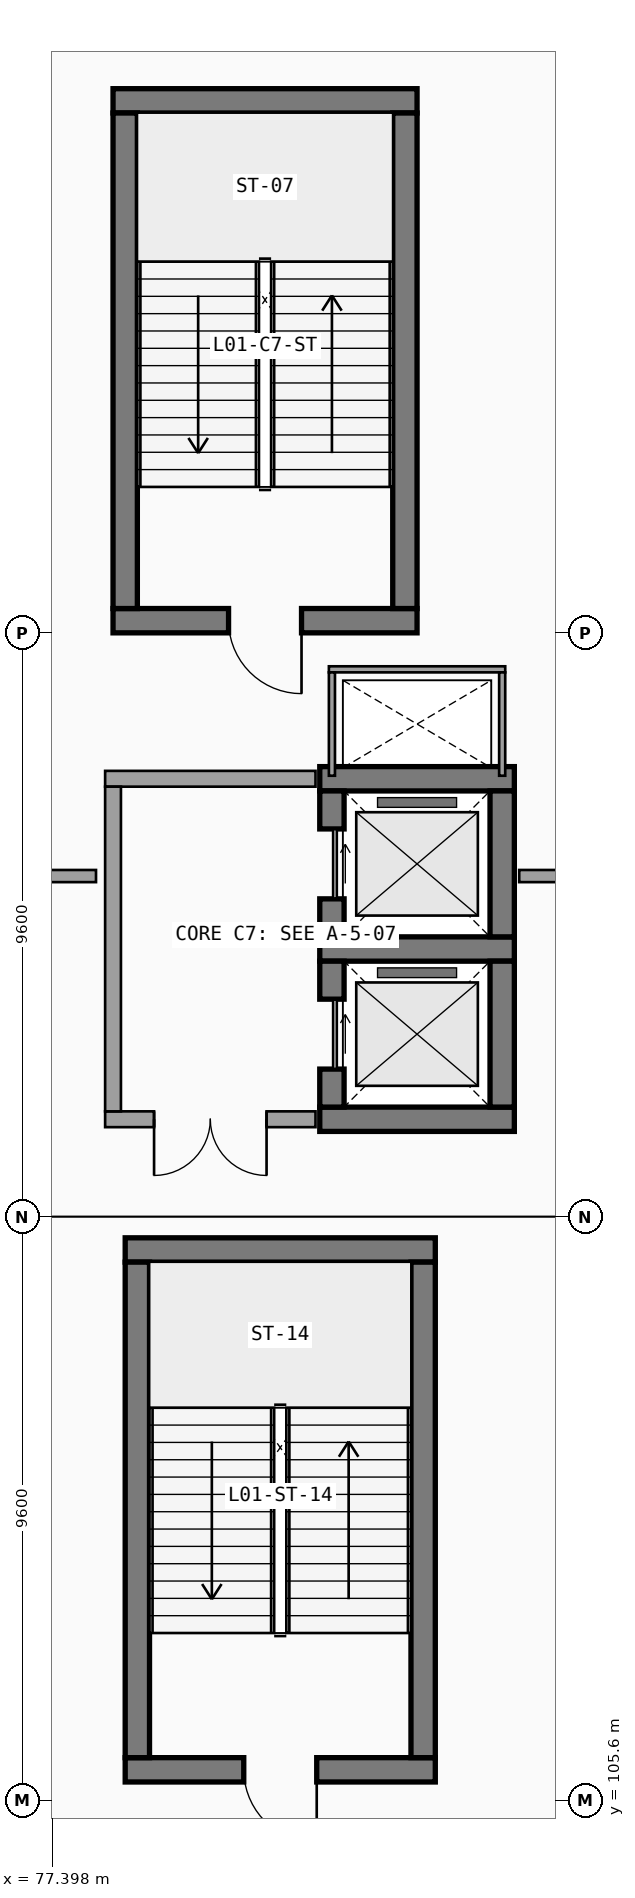
"""IFC4 building model, lengths in metres.
Left out: names, types, materials, properties, quantities, classifications, styles, units other than length and angle.
Written with IfcOpenShell. Run it as: python <this file> out.ifc"""

import sys

from ifc_helpers import new_model, si_unit, direction, frame, frame_2d, origin, place, context, subcontext, project, spatial, rectangle, extrude, element, fill, save


model = new_model("IFC4")
c1 = context("Model", 3, precision=1e-05, world=origin(), true_north=direction((0.0, 1.0)))
c2 = subcontext(c1, "Body", "Model", "MODEL_VIEW")
j1 = project(units=[si_unit("LENGTHUNIT", "METRE"), si_unit("PLANEANGLEUNIT", "RADIAN")], contexts=[c1])
p1 = place(None, origin())
s1 = spatial("IfcSite", under=j1, at=p1, CompositionType="ELEMENT")
p2 = place(p1, origin())
s2 = spatial("IfcBuilding", under=s1, at=p2, CompositionType="ELEMENT")
p3 = place(p2, frame((0.0, 0.0, 4.8)))
s3 = spatial("IfcBuildingStorey", under=s2, at=p3, CompositionType="ELEMENT", Elevation=4.8)
p4 = place(p3, frame((78.4, 125.0, 0.0), z_axis=(0.0, 0.0, 1.0), x_axis=(1.0, 0.0, 0.0)))
e1 = element("IfcWall", 1, at=p4, inside=s3, PredefinedType="SHEAR", context=c2, shape_type="SweptSolid", body=[
    extrude(rectangle(XDim=5.0, YDim=0.4, at=frame_2d((2.5, 0.0))), origin(), (0.0, 0.0, 1.0), 4.52),
])
p5 = place(p4, frame((3.1, 0.0, 0.0), z_axis=(0.0, 0.0, 1.0), x_axis=(-1.0, 0.0, 0.0)))
e2 = element("IfcOpeningElement", 2, at=p5, cuts=e1, PredefinedType="OPENING", context=c2, shape_type="SweptSolid", body=[
    extrude(rectangle(XDim=1.2, YDim=2.2, at=frame_2d((0.6, 1.1))), frame((0.0, 0.21, 0.0), z_axis=(0.0, -1.0, 0.0), x_axis=(1.0, 0.0, 0.0)), (0.0, 0.0, 1.0), 0.42),
])
p6 = place(p3, frame((83.4, 133.55, 0.0), z_axis=(0.0, 0.0, 1.0), x_axis=(-1.0, 0.0, 0.0)))
e3 = element("IfcWall", 3, at=p6, inside=s3, PredefinedType="SHEAR", context=c2, shape_type="SweptSolid", body=[
    extrude(rectangle(XDim=5.0, YDim=0.4, at=frame_2d((2.5, 0.0))), origin(), (0.0, 0.0, 1.0), 4.52),
])
for number, where, z_axis, x_axis in (
    (4, (78.6, 133.35, 0.0), (0.0, 0.0, 1.0), (0.0, -1.0, 0.0)),
    (5, (83.2, 125.2, 0.0), (0.0, 0.0, 1.0), (0.0, 1.0, 0.0)),
):
    element("IfcWall", number, at=place(p3, frame(where, z_axis=z_axis, x_axis=x_axis)), inside=s3, PredefinedType="SHEAR", context=c2, shape_type="SweptSolid", body=[
        extrude(rectangle(XDim=8.15, YDim=0.4, at=frame_2d((4.075, 0.0))), origin(), (0.0, 0.0, 1.0), 4.52),
    ])
for number, where, z_axis, x_axis in (
    (6, (81.8, 116.8, 0.0), (0.0, 0.0, 1.0), (1.0, 0.0, 0.0)),
    (7, (85.0, 119.6, 0.0), (0.0, 0.0, 1.0), (-1.0, 0.0, 0.0)),
):
    element("IfcWall", number, at=place(p3, frame(where, z_axis=z_axis, x_axis=x_axis)), inside=s3, PredefinedType="SHEAR", context=c2, shape_type="SweptSolid", body=[
        extrude(rectangle(XDim=3.2, YDim=0.4, at=frame_2d((1.6, 0.0))), origin(), (0.0, 0.0, 1.0), 4.52),
    ])
p7 = place(p3, frame((82.0, 119.4, 0.0), z_axis=(0.0, 0.0, 1.0), x_axis=(0.0, -1.0, 0.0)))
e8 = element("IfcWall", 8, at=p7, inside=s3, PredefinedType="SHEAR", context=c2, shape_type="SweptSolid", body=[
    extrude(rectangle(XDim=2.4, YDim=0.4, at=frame_2d((1.2, 0.0))), origin(), (0.0, 0.0, 1.0), 4.52),
])
p8 = place(p7, frame((0.625, 0.0, 0.0), z_axis=(0.0, 0.0, 1.0), x_axis=(1.0, 0.0, 0.0)))
e9 = element("IfcOpeningElement", 9, at=p8, cuts=e8, PredefinedType="OPENING", context=c2, shape_type="SweptSolid", body=[
    extrude(rectangle(XDim=1.15, YDim=2.2, at=frame_2d((0.575, 1.1))), frame((0.0, 0.21, 0.0), z_axis=(0.0, -1.0, 0.0), x_axis=(1.0, 0.0, 0.0)), (0.0, 0.0, 1.0), 0.42),
])
p9 = place(p3, frame((84.8, 117.0, 0.0), z_axis=(0.0, 0.0, 1.0), x_axis=(0.0, 1.0, 0.0)))
e10 = element("IfcWall", 10, at=p9, inside=s3, PredefinedType="SHEAR", context=c2, shape_type="SweptSolid", body=[
    extrude(rectangle(XDim=2.4, YDim=0.4, at=frame_2d((1.2, 0.0))), origin(), (0.0, 0.0, 1.0), 4.52),
])
p10 = place(p3, frame((85.0, 122.4, 0.0), z_axis=(0.0, 0.0, 1.0), x_axis=(-1.0, 0.0, 0.0)))
e11 = element("IfcWall", 11, at=p10, inside=s3, PredefinedType="SHEAR", context=c2, shape_type="SweptSolid", body=[
    extrude(rectangle(XDim=3.2, YDim=0.4, at=frame_2d((1.6, 0.0))), origin(), (0.0, 0.0, 1.0), 4.52),
])
p11 = place(p3, frame((82.0, 122.2, 0.0), z_axis=(0.0, 0.0, 1.0), x_axis=(0.0, -1.0, 0.0)))
e12 = element("IfcWall", 12, at=p11, inside=s3, PredefinedType="SHEAR", context=c2, shape_type="SweptSolid", body=[
    extrude(rectangle(XDim=2.4, YDim=0.4, at=frame_2d((1.2, 0.0))), origin(), (0.0, 0.0, 1.0), 4.52),
])
p12 = place(p11, frame((0.625, 0.0, 0.0), z_axis=(0.0, 0.0, 1.0), x_axis=(1.0, 0.0, 0.0)))
e13 = element("IfcOpeningElement", 13, at=p12, cuts=e12, PredefinedType="OPENING", context=c2, shape_type="SweptSolid", body=[
    extrude(rectangle(XDim=1.15, YDim=2.2, at=frame_2d((0.575, 1.1))), frame((0.0, 0.21, 0.0), z_axis=(0.0, -1.0, 0.0), x_axis=(1.0, 0.0, 0.0)), (0.0, 0.0, 1.0), 0.42),
])
p13 = place(p3, frame((84.8, 119.8, 0.0), z_axis=(0.0, 0.0, 1.0), x_axis=(0.0, 1.0, 0.0)))
e14 = element("IfcWall", 14, at=p13, inside=s3, PredefinedType="SHEAR", context=c2, shape_type="SweptSolid", body=[
    extrude(rectangle(XDim=2.4, YDim=0.4, at=frame_2d((1.2, 0.0))), origin(), (0.0, 0.0, 1.0), 4.52),
])
p14 = place(p3, frame((84.85, 124.2, 0.0), z_axis=(0.0, 0.0, 1.0), x_axis=(-1.0, 0.0, 0.0)))
e15 = element("IfcWall", 15, at=p14, inside=s3, PredefinedType="PARTITIONING", context=c2, shape_type="SweptSolid", body=[
    extrude(rectangle(XDim=2.9, YDim=0.1, at=frame_2d((1.45, 0.0))), origin(), (0.0, 0.0, 1.0), 4.52),
])
for number, where, z_axis, x_axis in (
    (16, (82.0, 124.15, 0.0), (0.0, 0.0, 1.0), (0.0, -1.0, 0.0)),
    (17, (84.8, 122.45, 0.0), (0.0, 0.0, 1.0), (0.0, 1.0, 0.0)),
):
    element("IfcWall", number, at=place(p3, frame(where, z_axis=z_axis, x_axis=x_axis)), inside=s3, PredefinedType="PARTITIONING", context=c2, shape_type="SweptSolid", body=[
        extrude(rectangle(XDim=1.7, YDim=0.1, at=frame_2d((0.85, 0.0))), origin(), (0.0, 0.0, 1.0), 4.52),
    ])
p15 = place(p3, frame((78.27, 116.8, 0.0), z_axis=(0.0, 0.0, 1.0), x_axis=(1.0, 0.0, 0.0)))
e18 = element("IfcWall", 18, at=p15, inside=s3, PredefinedType="SOLIDWALL", context=c2, shape_type="SweptSolid", body=[
    extrude(rectangle(XDim=3.46, YDim=0.26, at=frame_2d((1.73, 0.0))), origin(), (0.0, 0.0, 1.0), 4.52),
])
p16 = place(p15, frame((2.655, 0.0, 0.0), z_axis=(0.0, 0.0, 1.0), x_axis=(-1.0, 0.0, 0.0)))
e19 = element("IfcOpeningElement", 19, at=p16, cuts=e18, PredefinedType="OPENING", context=c2, shape_type="SweptSolid", body=[
    extrude(rectangle(XDim=1.85, YDim=2.25, at=frame_2d((0.925, 1.125))), frame((0.0, 0.14, 0.0), z_axis=(0.0, -1.0, 0.0), x_axis=(1.0, 0.0, 0.0)), (0.0, 0.0, 1.0), 0.28),
])
p17 = place(p3, frame((81.73, 122.4, 0.0), z_axis=(0.0, 0.0, 1.0), x_axis=(-1.0, 0.0, 0.0)))
e20 = element("IfcWall", 20, at=p17, inside=s3, PredefinedType="SOLIDWALL", context=c2, shape_type="SweptSolid", body=[
    extrude(rectangle(XDim=3.46, YDim=0.26, at=frame_2d((1.73, 0.0))), origin(), (0.0, 0.0, 1.0), 4.52),
])
p18 = place(p3, frame((78.4, 122.27, 0.0), z_axis=(0.0, 0.0, 1.0), x_axis=(0.0, -1.0, 0.0)))
e21 = element("IfcWall", 21, at=p18, inside=s3, PredefinedType="SOLIDWALL", context=c2, shape_type="SweptSolid", body=[
    extrude(rectangle(XDim=5.34, YDim=0.26, at=frame_2d((2.67, 0.0))), origin(), (0.0, 0.0, 1.0), 4.52),
])
p19 = place(p3, frame((78.6, 106.1, 0.0), z_axis=(0.0, 0.0, 1.0), x_axis=(1.0, 0.0, 0.0)))
e22 = element("IfcWall", 22, at=p19, inside=s3, PredefinedType="SHEAR", context=c2, shape_type="SweptSolid", body=[
    extrude(rectangle(XDim=5.1, YDim=0.4, at=frame_2d((2.55, 0.0))), origin(), (0.0, 0.0, 1.0), 4.52),
])
p20 = place(p19, frame((3.15, 0.0, 0.0), z_axis=(0.0, 0.0, 1.0), x_axis=(-1.0, 0.0, 0.0)))
e23 = element("IfcOpeningElement", 23, at=p20, cuts=e22, PredefinedType="OPENING", context=c2, shape_type="SweptSolid", body=[
    extrude(rectangle(XDim=1.2, YDim=2.2, at=frame_2d((0.6, 1.1))), frame((0.0, 0.21, 0.0), z_axis=(0.0, -1.0, 0.0), x_axis=(1.0, 0.0, 0.0)), (0.0, 0.0, 1.0), 0.42),
])
p21 = place(p3, frame((83.7, 114.65, 0.0), z_axis=(0.0, 0.0, 1.0), x_axis=(-1.0, 0.0, 0.0)))
e24 = element("IfcWall", 24, at=p21, inside=s3, PredefinedType="SHEAR", context=c2, shape_type="SweptSolid", body=[
    extrude(rectangle(XDim=5.1, YDim=0.4, at=frame_2d((2.55, 0.0))), origin(), (0.0, 0.0, 1.0), 4.52),
])
for number, where, z_axis, x_axis in (
    (25, (78.8, 114.45, 0.0), (0.0, 0.0, 1.0), (0.0, -1.0, 0.0)),
    (26, (83.5, 106.3, 0.0), (0.0, 0.0, 1.0), (0.0, 1.0, 0.0)),
):
    element("IfcWall", number, at=place(p3, frame(where, z_axis=z_axis, x_axis=x_axis)), inside=s3, PredefinedType="SHEAR", context=c2, shape_type="SweptSolid", body=[
        extrude(rectangle(XDim=8.15, YDim=0.4, at=frame_2d((4.075, 0.0))), origin(), (0.0, 0.0, 1.0), 4.52),
    ])
p22 = place(p3, frame((95.78, 120.8, 0.0), z_axis=(0.0, 0.0, 1.0), x_axis=(-1.0, 0.0, 0.0)))
e27 = element("IfcWall", 27, at=p22, inside=s3, PredefinedType="PARTITIONING", context=c2, shape_type="SweptSolid", body=[
    extrude(rectangle(XDim=10.7, YDim=0.2, at=frame_2d((5.35, 0.0))), origin(), (0.0, 0.0, 1.0), 3.913),
])
p23 = place(p22, frame((4.6, 0.0, 0.0), z_axis=(0.0, 0.0, 1.0), x_axis=(1.0, 0.0, 0.0)))
e28 = element("IfcOpeningElement", 28, at=p23, cuts=e27, PredefinedType="OPENING", context=c2, shape_type="SweptSolid", body=[
    extrude(rectangle(XDim=1.5, YDim=2.25, at=frame_2d((0.75, 1.125))), frame((0.0, 0.11, 0.0), z_axis=(0.0, -1.0, 0.0), x_axis=(1.0, 0.0, 0.0)), (0.0, 0.0, 1.0), 0.22),
])
p24 = place(p3, frame((78.12, 120.8, 0.0), z_axis=(0.0, 0.0, 1.0), x_axis=(-1.0, 0.0, 0.0)))
e29 = element("IfcWall", 29, at=p24, inside=s3, PredefinedType="PARTITIONING", context=c2, shape_type="SweptSolid", body=[
    extrude(rectangle(XDim=10.52, YDim=0.2, at=frame_2d((5.26, 0.0))), origin(), (0.0, 0.0, 1.0), 3.913),
])
p25 = place(p5, origin())
e30 = element("IfcDoor", 30, at=p25, inside=s3, OperationType="SINGLE_SWING_LEFT", PredefinedType="DOOR", context=c2, shape_type="SweptSolid", body=[
    extrude(rectangle(XDim=1.2, YDim=2.2, at=frame_2d((0.6, 1.1))), frame((0.0, 0.025, 0.0), z_axis=(0.0, -1.0, 0.0), x_axis=(1.0, 0.0, 0.0)), (0.0, 0.0, 1.0), 0.05),
])
fill(e2, e30)
p26 = place(p8, origin())
e31 = element("IfcDoor", 31, at=p26, inside=s3, OperationType="SLIDING_TO_LEFT", PredefinedType="DOOR", context=c2, shape_type="SweptSolid", body=[
    extrude(rectangle(XDim=1.15, YDim=2.2, at=frame_2d((0.575, 1.1))), frame((0.0, 0.025, 0.0), z_axis=(0.0, -1.0, 0.0), x_axis=(1.0, 0.0, 0.0)), (0.0, 0.0, 1.0), 0.05),
])
fill(e9, e31)
p27 = place(p12, origin())
e32 = element("IfcDoor", 32, at=p27, inside=s3, OperationType="SLIDING_TO_LEFT", PredefinedType="DOOR", context=c2, shape_type="SweptSolid", body=[
    extrude(rectangle(XDim=1.15, YDim=2.2, at=frame_2d((0.575, 1.1))), frame((0.0, 0.025, 0.0), z_axis=(0.0, -1.0, 0.0), x_axis=(1.0, 0.0, 0.0)), (0.0, 0.0, 1.0), 0.05),
])
fill(e13, e32)
p28 = place(p16, origin())
e33 = element("IfcDoor", 33, at=p28, inside=s3, OperationType="DOUBLE_DOOR_SINGLE_SWING", PredefinedType="DOOR", context=c2, shape_type="SweptSolid", body=[
    extrude(rectangle(XDim=1.85, YDim=2.25, at=frame_2d((0.925, 1.125))), frame((0.0, 0.025, 0.0), z_axis=(0.0, -1.0, 0.0), x_axis=(1.0, 0.0, 0.0)), (0.0, 0.0, 1.0), 0.05),
])
fill(e19, e33)
p29 = place(p20, origin())
e34 = element("IfcDoor", 34, at=p29, inside=s3, OperationType="SINGLE_SWING_LEFT", PredefinedType="DOOR", context=c2, shape_type="SweptSolid", body=[
    extrude(rectangle(XDim=1.2, YDim=2.2, at=frame_2d((0.6, 1.1))), frame((0.0, 0.025, 0.0), z_axis=(0.0, -1.0, 0.0), x_axis=(1.0, 0.0, 0.0)), (0.0, 0.0, 1.0), 0.05),
])
fill(e23, e34)
save(model, sys.argv[1])
